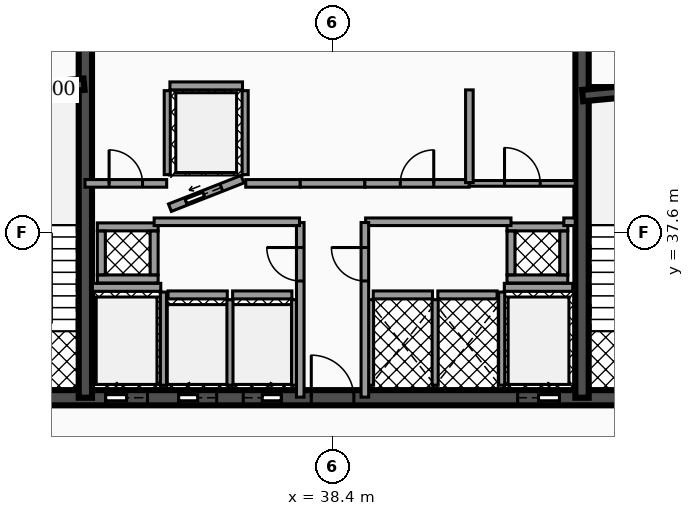
"""IFC4 building model, lengths in metres.
Left out: names, types, materials, properties, quantities, classifications, styles, units other than length and angle.
Written with IfcOpenShell. Run it as: python <this file> out.ifc"""

import sys

from ifc_helpers import new_model, si_unit, direction, frame, frame_2d, origin, place, context, subcontext, project, spatial, rectangle, extrude, element, fill, save


model = new_model("IFC4")
c1 = context("Model", 3, precision=1e-05, world=origin(), true_north=direction((0.0, 1.0)))
c2 = subcontext(c1, "Body", "Model", "MODEL_VIEW")
j1 = project(units=[si_unit("LENGTHUNIT", "METRE"), si_unit("PLANEANGLEUNIT", "RADIAN")], contexts=[c1])
p1 = place(None, origin())
s1 = spatial("IfcSite", under=j1, at=p1, CompositionType="ELEMENT")
p2 = place(p1, origin())
s2 = spatial("IfcBuilding", under=s1, at=p2, CompositionType="ELEMENT")
p3 = place(p2, frame((0.0, 0.0, 160.82)))
s3 = spatial("IfcBuildingStorey", under=s2, at=p3, CompositionType="ELEMENT", Elevation=160.82)
p4 = place(p3, frame((28.4, 33.25, 0.0), z_axis=(0.0, 0.0, 1.0), x_axis=(1.0, 0.0, 0.0)))
e1 = element("IfcWall", 1, at=p4, inside=s3, PredefinedType="SHEAR", context=c2, shape_type="SweptSolid", body=[
    extrude(rectangle(XDim=20.06, YDim=0.4, at=frame_2d((10.03, 0.0))), origin(), (0.0, 0.0, 1.0), 3.5),
])
p5 = place(p4, frame((4.03, 0.0, 0.0)))
e2 = element("IfcOpeningElement", 2, at=p5, cuts=e1, PredefinedType="OPENING", context=c2, shape_type="SweptSolid", body=[
    extrude(rectangle(XDim=1.1, YDim=2.15, at=frame_2d((0.55, 1.075))), frame((0.0, 0.21, 0.0), z_axis=(0.0, -1.0, 0.0), x_axis=(1.0, 0.0, 0.0)), (0.0, 0.0, 1.0), 0.42),
])
p6 = place(p4, frame((14.87, 0.0, 0.0)))
e3 = element("IfcOpeningElement", 3, at=p6, cuts=e1, PredefinedType="OPENING", context=c2, shape_type="SweptSolid", body=[
    extrude(rectangle(XDim=1.1, YDim=2.15, at=frame_2d((0.55, 1.075))), frame((0.0, 0.21, 0.0), z_axis=(0.0, -1.0, 0.0), x_axis=(1.0, 0.0, 0.0)), (0.0, 0.0, 1.0), 0.42),
])
p7 = place(p4, frame((5.95, 0.0, 0.0)))
e4 = element("IfcOpeningElement", 4, at=p7, cuts=e1, PredefinedType="OPENING", context=c2, shape_type="SweptSolid", body=[
    extrude(rectangle(XDim=1.0, YDim=2.1, at=frame_2d((0.5, 1.05))), frame((0.0, 0.21, 0.0), z_axis=(0.0, -1.0, 0.0), x_axis=(1.0, 0.0, 0.0)), (0.0, 0.0, 1.0), 0.42),
])
p8 = place(p4, frame((7.65, 0.0, 0.0)))
e5 = element("IfcOpeningElement", 5, at=p8, cuts=e1, PredefinedType="OPENING", context=c2, shape_type="SweptSolid", body=[
    extrude(rectangle(XDim=1.0, YDim=2.1, at=frame_2d((0.5, 1.05))), frame((0.0, 0.21, 0.0), z_axis=(0.0, -1.0, 0.0), x_axis=(1.0, 0.0, 0.0)), (0.0, 0.0, 1.0), 0.42),
])
p9 = place(p4, frame((1.31, 0.0, 0.0)))
e6 = element("IfcOpeningElement", 6, at=p9, cuts=e1, PredefinedType="OPENING", context=c2, shape_type="SweptSolid", body=[
    extrude(rectangle(XDim=1.1, YDim=2.2, at=frame_2d((0.55, 1.1))), frame((0.0, 0.21, 0.0), z_axis=(0.0, -1.0, 0.0), x_axis=(1.0, 0.0, 0.0)), (0.0, 0.0, 1.0), 0.42),
])
p10 = place(p4, frame((9.44, 0.0, 0.0)))
e7 = element("IfcOpeningElement", 7, at=p10, cuts=e1, PredefinedType="OPENING", context=c2, shape_type="SweptSolid", body=[
    extrude(rectangle(XDim=1.12, YDim=2.05, at=frame_2d((0.56, 1.025))), frame((0.0, 0.21, 0.0), z_axis=(0.0, -1.0, 0.0), x_axis=(1.0, 0.0, 0.0)), (0.0, 0.0, 1.0), 0.42),
])
p11 = place(p4, frame((17.65, 0.0, 0.0)))
e8 = element("IfcOpeningElement", 8, at=p11, cuts=e1, PredefinedType="OPENING", context=c2, shape_type="SweptSolid", body=[
    extrude(rectangle(XDim=1.1, YDim=2.2, at=frame_2d((0.55, 1.1))), frame((0.0, 0.21, 0.0), z_axis=(0.0, -1.0, 0.0), x_axis=(1.0, 0.0, 0.0)), (0.0, 0.0, 1.0), 0.42),
])
for number, where, z_axis, x_axis in (
    (9, (31.895, 33.25, 0.0), (0.0, 0.0, 1.0), (0.0, 1.0, 0.0)),
    (10, (44.965, 33.25, 0.0), (0.0, 0.0, 1.0), (0.0, 1.0, 0.0)),
):
    element("IfcWall", number, at=place(p3, frame(where, z_axis=z_axis, x_axis=x_axis)), inside=s3, PredefinedType="SHEAR", context=c2, shape_type="SweptSolid", body=[
        extrude(rectangle(XDim=10.2, YDim=0.35, at=frame_2d((5.1, 0.0))), origin(), (0.0, 0.0, 1.0), 3.5),
    ])
p12 = place(p3, frame((28.64, 41.2, 0.0), z_axis=(0.0, 0.0, 1.0), x_axis=(0.995687118776, 0.092774789157, 0.0)))
e11 = element("IfcWall", 11, at=p12, inside=s3, PredefinedType="SHEAR", context=c2, shape_type="SweptSolid", body=[
    extrude(rectangle(XDim=3.234, YDim=0.3, at=frame_2d((1.617, 0.0))), origin(), (0.0, 0.0, 1.0), 3.5),
])
p13 = place(p3, frame((44.98, 41.2, 0.0), z_axis=(0.0, 0.0, 1.0), x_axis=(0.995686468965, 0.09278176286, 0.0)))
e12 = element("IfcWall", 12, at=p13, inside=s3, PredefinedType="SHEAR", context=c2, shape_type="SweptSolid", body=[
    extrude(rectangle(XDim=3.234, YDim=0.3, at=frame_2d((1.617, 0.0))), origin(), (0.0, 0.0, 1.0), 3.5),
])
p14 = place(p3, frame((32.08, 36.155, 0.0), z_axis=(0.0, 0.0, 1.0), x_axis=(1.0, 0.0, 0.0)))
e13 = element("IfcWall", 13, at=p14, inside=s3, PredefinedType="SOLIDWALL", context=c2, shape_type="SweptSolid", body=[
    extrude(rectangle(XDim=1.8, YDim=0.21, at=frame_2d((0.9, 0.0))), origin(), (0.0, 0.0, 1.0), 2.472),
])
p15 = place(p3, frame((33.95, 33.58, 0.0), z_axis=(0.0, 0.0, 1.0), x_axis=(0.0, 1.0, 0.0)))
e14 = element("IfcWall", 14, at=p15, inside=s3, PredefinedType="SOLIDWALL", context=c2, shape_type="SweptSolid", body=[
    extrude(rectangle(XDim=2.45, YDim=0.16, at=frame_2d((1.225, 0.0))), origin(), (0.0, 0.0, 1.0), 2.472),
])
p16 = place(p3, frame((42.92, 36.155, 0.0), z_axis=(0.0, 0.0, 1.0), x_axis=(1.0, 0.0, 0.0)))
e15 = element("IfcWall", 15, at=p16, inside=s3, PredefinedType="SOLIDWALL", context=c2, shape_type="SweptSolid", body=[
    extrude(rectangle(XDim=1.8, YDim=0.21, at=frame_2d((0.9, 0.0))), origin(), (0.0, 0.0, 1.0), 2.472),
])
p17 = place(p3, frame((42.85, 33.58, 0.0), z_axis=(0.0, 0.0, 1.0), x_axis=(0.0, 1.0, 0.0)))
e16 = element("IfcWall", 16, at=p17, inside=s3, PredefinedType="SOLIDWALL", context=c2, shape_type="SweptSolid", body=[
    extrude(rectangle(XDim=2.45, YDim=0.16, at=frame_2d((1.225, 0.0))), origin(), (0.0, 0.0, 1.0), 2.472),
])
p18 = place(p3, frame((34.07, 35.955, 0.0), z_axis=(0.0, 0.0, 1.0), x_axis=(1.0, 0.0, 0.0)))
e17 = element("IfcWall", 17, at=p18, inside=s3, PredefinedType="SOLIDWALL", context=c2, shape_type="SweptSolid", body=[
    extrude(rectangle(XDim=1.56, YDim=0.21, at=frame_2d((0.78, 0.0))), origin(), (0.0, 0.0, 1.0), 2.472),
])
p19 = place(p3, frame((35.7, 33.58, 0.0), z_axis=(0.0, 0.0, 1.0), x_axis=(0.0, 1.0, 0.0)))
e18 = element("IfcWall", 18, at=p19, inside=s3, PredefinedType="SOLIDWALL", context=c2, shape_type="SweptSolid", body=[
    extrude(rectangle(XDim=2.25, YDim=0.16, at=frame_2d((1.125, 0.0))), origin(), (0.0, 0.0, 1.0), 2.472),
])
p20 = place(p3, frame((35.77, 35.955, 0.0), z_axis=(0.0, 0.0, 1.0), x_axis=(1.0, 0.0, 0.0)))
e19 = element("IfcWall", 19, at=p20, inside=s3, PredefinedType="SOLIDWALL", context=c2, shape_type="SweptSolid", body=[
    extrude(rectangle(XDim=1.56, YDim=0.21, at=frame_2d((0.78, 0.0))), origin(), (0.0, 0.0, 1.0), 2.472),
])
p21 = place(p3, frame((37.4, 33.58, 0.0), z_axis=(0.0, 0.0, 1.0), x_axis=(0.0, 1.0, 0.0)))
e20 = element("IfcWall", 20, at=p21, inside=s3, PredefinedType="SOLIDWALL", context=c2, shape_type="SweptSolid", body=[
    extrude(rectangle(XDim=2.25, YDim=0.16, at=frame_2d((1.125, 0.0))), origin(), (0.0, 0.0, 1.0), 2.472),
])
p22 = place(p3, frame((34.12, 38.25, 0.0), z_axis=(0.0, 0.0, 1.0), x_axis=(0.930804993012, 0.36551616241, 0.0)))
e21 = element("IfcWall", 21, at=p22, inside=s3, PredefinedType="SOLIDWALL", context=c2, shape_type="SweptSolid", body=[
    extrude(rectangle(XDim=2.052, YDim=0.21, at=frame_2d((1.026, 0.0))), origin(), (0.0, 0.0, 1.0), 2.472),
])
p23 = place(p22, frame((0.455, 0.0, 0.0)))
e22 = element("IfcOpeningElement", 22, at=p23, cuts=e21, PredefinedType="OPENING", context=c2, shape_type="SweptSolid", body=[
    extrude(rectangle(XDim=1.0, YDim=2.1, at=frame_2d((0.5, 1.05))), frame((0.0, 0.115, 0.0), z_axis=(0.0, -1.0, 0.0), x_axis=(1.0, 0.0, 0.0)), (0.0, 0.0, 1.0), 0.23),
])
p24 = place(p3, frame((34.12, 41.455, 0.0), z_axis=(0.0, 0.0, 1.0), x_axis=(1.0, 0.0, 0.0)))
e23 = element("IfcWall", 23, at=p24, inside=s3, PredefinedType="SOLIDWALL", context=c2, shape_type="SweptSolid", body=[
    extrude(rectangle(XDim=1.91, YDim=0.21, at=frame_2d((0.955, 0.0))), origin(), (0.0, 0.0, 1.0), 2.472),
])
for number, where, z_axis, x_axis in (
    (24, (34.05, 39.12, 0.0), (0.0, 0.0, 1.0), (0.0, 1.0, 0.0)),
    (25, (36.1, 39.12, 0.0), (0.0, 0.0, 1.0), (0.0, 1.0, 0.0)),
):
    element("IfcWall", number, at=place(p3, frame(where, z_axis=z_axis, x_axis=x_axis)), inside=s3, PredefinedType="SOLIDWALL", context=c2, shape_type="SweptSolid", body=[
        extrude(rectangle(XDim=2.21, YDim=0.16, at=frame_2d((1.105, 0.0))), origin(), (0.0, 0.0, 1.0), 2.472),
    ])
p25 = place(p3, frame((39.47, 35.955, 0.0), z_axis=(0.0, 0.0, 1.0), x_axis=(1.0, 0.0, 0.0)))
e26 = element("IfcWall", 26, at=p25, inside=s3, PredefinedType="SOLIDWALL", context=c2, shape_type="SweptSolid", body=[
    extrude(rectangle(XDim=1.56, YDim=0.21, at=frame_2d((0.78, 0.0))), origin(), (0.0, 0.0, 1.0), 2.472),
])
for number, where, z_axis, x_axis in (
    (27, (39.4, 33.58, 0.0), (0.0, 0.0, 1.0), (0.0, 1.0, 0.0)),
    (28, (41.1, 33.58, 0.0), (0.0, 0.0, 1.0), (0.0, 1.0, 0.0)),
):
    element("IfcWall", number, at=place(p3, frame(where, z_axis=z_axis, x_axis=x_axis)), inside=s3, PredefinedType="SOLIDWALL", context=c2, shape_type="SweptSolid", body=[
        extrude(rectangle(XDim=2.25, YDim=0.16, at=frame_2d((1.125, 0.0))), origin(), (0.0, 0.0, 1.0), 2.472),
    ])
p26 = place(p3, frame((41.17, 35.955, 0.0), z_axis=(0.0, 0.0, 1.0), x_axis=(1.0, 0.0, 0.0)))
e29 = element("IfcWall", 29, at=p26, inside=s3, PredefinedType="SOLIDWALL", context=c2, shape_type="SweptSolid", body=[
    extrude(rectangle(XDim=1.56, YDim=0.21, at=frame_2d((0.78, 0.0))), origin(), (0.0, 0.0, 1.0), 2.472),
])
for number, where, z_axis, x_axis in (
    (30, (32.21, 36.375, 0.0), (0.0, 0.0, 1.0), (1.0, 0.0, 0.0)),
    (31, (32.21, 37.745, 0.0), (0.0, 0.0, 1.0), (1.0, 0.0, 0.0)),
):
    element("IfcWall", number, at=place(p3, frame(where, z_axis=z_axis, x_axis=x_axis)), inside=s3, PredefinedType="SOLIDWALL", context=c2, shape_type="SweptSolid", body=[
        extrude(rectangle(XDim=1.6, YDim=0.21, at=frame_2d((0.8, 0.0))), origin(), (0.0, 0.0, 1.0), 3.5),
    ])
for number, where, z_axis, x_axis in (
    (32, (32.315, 36.485, 0.0), (0.0, 0.0, 1.0), (0.0, 1.0, 0.0)),
    (33, (33.705, 36.485, 0.0), (0.0, 0.0, 1.0), (0.0, 1.0, 0.0)),
):
    element("IfcWall", number, at=place(p3, frame(where, z_axis=z_axis, x_axis=x_axis)), inside=s3, PredefinedType="SOLIDWALL", context=c2, shape_type="SweptSolid", body=[
        extrude(rectangle(XDim=1.15, YDim=0.21, at=frame_2d((0.575, 0.0))), origin(), (0.0, 0.0, 1.0), 3.5),
    ])
for number, where, z_axis, x_axis in (
    (34, (42.99, 36.375, 0.0), (0.0, 0.0, 1.0), (1.0, 0.0, 0.0)),
    (35, (42.99, 37.745, 0.0), (0.0, 0.0, 1.0), (1.0, 0.0, 0.0)),
):
    element("IfcWall", number, at=place(p3, frame(where, z_axis=z_axis, x_axis=x_axis)), inside=s3, PredefinedType="SOLIDWALL", context=c2, shape_type="SweptSolid", body=[
        extrude(rectangle(XDim=1.6, YDim=0.21, at=frame_2d((0.8, 0.0))), origin(), (0.0, 0.0, 1.0), 3.5),
    ])
for number, where, z_axis, x_axis in (
    (36, (43.095, 36.485, 0.0), (0.0, 0.0, 1.0), (0.0, 1.0, 0.0)),
    (37, (44.485, 36.485, 0.0), (0.0, 0.0, 1.0), (0.0, 1.0, 0.0)),
):
    element("IfcWall", number, at=place(p3, frame(where, z_axis=z_axis, x_axis=x_axis)), inside=s3, PredefinedType="SOLIDWALL", context=c2, shape_type="SweptSolid", body=[
        extrude(rectangle(XDim=1.15, YDim=0.21, at=frame_2d((0.575, 0.0))), origin(), (0.0, 0.0, 1.0), 3.5),
    ])
p27 = place(p3, frame((37.55, 33.265, 0.0), z_axis=(0.0, 0.0, 1.0), x_axis=(0.0, 1.0, 0.0)))
e38 = element("IfcWall", 38, at=p27, inside=s3, PredefinedType="PARTITIONING", context=c2, shape_type="SweptSolid", body=[
    extrude(rectangle(XDim=4.595, YDim=0.2, at=frame_2d((2.298, 0.0))), origin(), (0.0, 0.0, 1.0), 2.457),
])
p28 = place(p27, frame((3.058, 0.0, 0.0)))
e39 = element("IfcOpeningElement", 39, at=p28, cuts=e38, PredefinedType="OPENING", context=c2, shape_type="SweptSolid", body=[
    extrude(rectangle(XDim=0.88, YDim=2.05, at=frame_2d((0.44, 1.025))), frame((0.0, 0.11, 0.0), z_axis=(0.0, -1.0, 0.0), x_axis=(1.0, 0.0, 0.0)), (0.0, 0.0, 1.0), 0.22),
])
p29 = place(p3, frame((33.705, 37.88, 0.0), z_axis=(0.0, 0.0, 1.0), x_axis=(1.0, 0.0, 0.0)))
e40 = element("IfcWall", 40, at=p29, inside=s3, PredefinedType="PARTITIONING", context=c2, shape_type="SweptSolid", body=[
    extrude(rectangle(XDim=3.825, YDim=0.2, at=frame_2d((1.913, 0.0))), origin(), (0.0, 0.0, 1.0), 2.457),
])
p30 = place(p3, frame((31.885, 38.89, 0.0), z_axis=(0.0, 0.0, 1.0), x_axis=(1.0, 0.0, 0.0)))
e41 = element("IfcWall", 41, at=p30, inside=s3, PredefinedType="PARTITIONING", context=c2, shape_type="SweptSolid", body=[
    extrude(rectangle(XDim=2.15, YDim=0.2, at=frame_2d((1.075, 0.0))), origin(), (0.0, 0.0, 1.0), 2.457),
])
p31 = place(p30, frame((0.635, 0.0, 0.0)))
e42 = element("IfcOpeningElement", 42, at=p31, cuts=e41, PredefinedType="OPENING", context=c2, shape_type="SweptSolid", body=[
    extrude(rectangle(XDim=0.88, YDim=2.05, at=frame_2d((0.44, 1.025))), frame((0.0, 0.11, 0.0), z_axis=(0.0, -1.0, 0.0), x_axis=(1.0, 0.0, 0.0)), (0.0, 0.0, 1.0), 0.22),
])
p32 = place(p3, frame((36.115, 38.89, 0.0), z_axis=(0.0, 0.0, 1.0), x_axis=(1.0, 0.0, 0.0)))
e43 = element("IfcWall", 43, at=p32, inside=s3, PredefinedType="PARTITIONING", context=c2, shape_type="SweptSolid", body=[
    extrude(rectangle(XDim=1.435, YDim=0.2, at=frame_2d((0.718, 0.0))), origin(), (0.0, 0.0, 1.0), 2.457),
])
p33 = place(p3, frame((37.55, 38.89, 0.0), z_axis=(0.0, 0.0, 1.0), x_axis=(1.0, 0.0, 0.0)))
e44 = element("IfcWall", 44, at=p33, inside=s3, PredefinedType="PARTITIONING", context=c2, shape_type="SweptSolid", body=[
    extrude(rectangle(XDim=1.7, YDim=0.2, at=frame_2d((0.85, 0.0))), origin(), (0.0, 0.0, 1.0), 2.457),
])
p34 = place(p3, frame((39.25, 38.89, 0.0), z_axis=(0.0, 0.0, 1.0), x_axis=(1.0, 0.0, 0.0)))
e45 = element("IfcWall", 45, at=p34, inside=s3, PredefinedType="PARTITIONING", context=c2, shape_type="SweptSolid", body=[
    extrude(rectangle(XDim=2.745, YDim=0.2, at=frame_2d((1.373, 0.0))), origin(), (0.0, 0.0, 1.0), 2.457),
])
p35 = place(p34, frame((0.933, 0.0, 0.0)))
e46 = element("IfcOpeningElement", 46, at=p35, cuts=e45, PredefinedType="OPENING", context=c2, shape_type="SweptSolid", body=[
    extrude(rectangle(XDim=0.88, YDim=2.05, at=frame_2d((0.44, 1.025))), frame((0.0, 0.11, 0.0), z_axis=(0.0, -1.0, 0.0), x_axis=(1.0, 0.0, 0.0)), (0.0, 0.0, 1.0), 0.22),
])
p36 = place(p3, frame((42.005, 38.89, 0.0), z_axis=(0.0, 0.0, 1.0), x_axis=(1.0, 0.0, 0.0)))
e47 = element("IfcWall", 47, at=p36, inside=s3, PredefinedType="PARTITIONING", context=c2, shape_type="SweptSolid", body=[
    extrude(rectangle(XDim=2.78, YDim=0.15, at=frame_2d((1.39, 0.0))), origin(), (0.0, 0.0, 1.0), 2.457),
])
p37 = place(p36, frame((0.92, 0.0, 0.0)))
e48 = element("IfcOpeningElement", 48, at=p37, cuts=e47, PredefinedType="OPENING", context=c2, shape_type="SweptSolid", body=[
    extrude(rectangle(XDim=0.94, YDim=2.05, at=frame_2d((0.47, 1.025))), frame((0.0, 0.085, 0.0), z_axis=(0.0, -1.0, 0.0), x_axis=(1.0, 0.0, 0.0)), (0.0, 0.0, 1.0), 0.17),
])
p38 = place(p3, frame((39.27, 37.88, 0.0), z_axis=(0.0, 0.0, 1.0), x_axis=(1.0, 0.0, 0.0)))
e49 = element("IfcWall", 49, at=p38, inside=s3, PredefinedType="PARTITIONING", context=c2, shape_type="SweptSolid", body=[
    extrude(rectangle(XDim=3.825, YDim=0.2, at=frame_2d((1.913, 0.0))), origin(), (0.0, 0.0, 1.0), 2.457),
])
p39 = place(p3, frame((44.485, 37.88, 0.0), z_axis=(0.0, 0.0, 1.0), x_axis=(1.0, 0.0, 0.0)))
e50 = element("IfcWall", 50, at=p39, inside=s3, PredefinedType="PARTITIONING", context=c2, shape_type="SweptSolid", body=[
    extrude(rectangle(XDim=0.3, YDim=0.2, at=frame_2d((0.15, 0.0))), origin(), (0.0, 0.0, 1.0), 2.457),
])
p40 = place(p3, frame((39.25, 33.265, 0.0), z_axis=(0.0, 0.0, 1.0), x_axis=(0.0, 1.0, 0.0)))
e51 = element("IfcWall", 51, at=p40, inside=s3, PredefinedType="PARTITIONING", context=c2, shape_type="SweptSolid", body=[
    extrude(rectangle(XDim=4.595, YDim=0.2, at=frame_2d((2.298, 0.0))), origin(), (0.0, 0.0, 1.0), 2.457),
])
p41 = place(p40, frame((3.058, 0.0, 0.0)))
e52 = element("IfcOpeningElement", 52, at=p41, cuts=e51, PredefinedType="OPENING", context=c2, shape_type="SweptSolid", body=[
    extrude(rectangle(XDim=0.88, YDim=2.05, at=frame_2d((0.44, 1.025))), frame((0.0, 0.11, 0.0), z_axis=(0.0, -1.0, 0.0), x_axis=(1.0, 0.0, 0.0)), (0.0, 0.0, 1.0), 0.22),
])
p42 = place(p3, frame((42.0, 38.91, 0.0), z_axis=(0.0, 0.0, 1.0), x_axis=(0.0, 1.0, 0.0)))
e53 = element("IfcWall", 53, at=p42, inside=s3, PredefinedType="PARTITIONING", context=c2, shape_type="SweptSolid", body=[
    extrude(rectangle(XDim=2.44, YDim=0.2, at=frame_2d((1.22, 0.0))), origin(), (0.0, 0.0, 1.0), 2.457),
])
p43 = place(p5, origin())
e54 = element("IfcDoor", 54, at=p43, inside=s3, OperationType="SLIDING_TO_LEFT", PredefinedType="DOOR", context=c2, shape_type="SweptSolid", body=[
    extrude(rectangle(XDim=1.1, YDim=2.15, at=frame_2d((0.55, 1.075))), frame((0.0, 0.025, 0.0), z_axis=(0.0, -1.0, 0.0), x_axis=(1.0, 0.0, 0.0)), (0.0, 0.0, 1.0), 0.05),
])
fill(e2, e54)
p44 = place(p6, origin())
e55 = element("IfcDoor", 55, at=p44, inside=s3, OperationType="SLIDING_TO_RIGHT", PredefinedType="DOOR", context=c2, shape_type="SweptSolid", body=[
    extrude(rectangle(XDim=1.1, YDim=2.15, at=frame_2d((0.55, 1.075))), frame((0.0, 0.025, 0.0), z_axis=(0.0, -1.0, 0.0), x_axis=(1.0, 0.0, 0.0)), (0.0, 0.0, 1.0), 0.05),
])
fill(e3, e55)
p45 = place(p7, origin())
e56 = element("IfcDoor", 56, at=p45, inside=s3, OperationType="SLIDING_TO_LEFT", PredefinedType="DOOR", context=c2, shape_type="SweptSolid", body=[
    extrude(rectangle(XDim=1.0, YDim=2.1, at=frame_2d((0.5, 1.05))), frame((0.0, 0.025, 0.0), z_axis=(0.0, -1.0, 0.0), x_axis=(1.0, 0.0, 0.0)), (0.0, 0.0, 1.0), 0.05),
])
fill(e4, e56)
p46 = place(p8, origin())
e57 = element("IfcDoor", 57, at=p46, inside=s3, OperationType="SLIDING_TO_RIGHT", PredefinedType="DOOR", context=c2, shape_type="SweptSolid", body=[
    extrude(rectangle(XDim=1.0, YDim=2.1, at=frame_2d((0.5, 1.05))), frame((0.0, 0.025, 0.0), z_axis=(0.0, -1.0, 0.0), x_axis=(1.0, 0.0, 0.0)), (0.0, 0.0, 1.0), 0.05),
])
fill(e5, e57)
p47 = place(p23, origin())
e58 = element("IfcDoor", 58, at=p47, inside=s3, OperationType="SLIDING_TO_LEFT", PredefinedType="DOOR", context=c2, shape_type="SweptSolid", body=[
    extrude(rectangle(XDim=1.0, YDim=2.1, at=frame_2d((0.5, 1.05))), frame((0.0, 0.025, 0.0), z_axis=(0.0, -1.0, 0.0), x_axis=(1.0, 0.0, 0.0)), (0.0, 0.0, 1.0), 0.05),
])
fill(e22, e58)
p48 = place(p10, origin())
e59 = element("IfcDoor", 59, at=p48, inside=s3, OperationType="SINGLE_SWING_LEFT", PredefinedType="DOOR", context=c2, shape_type="SweptSolid", body=[
    extrude(rectangle(XDim=1.12, YDim=2.05, at=frame_2d((0.56, 1.025))), frame((0.0, 0.025, 0.0), z_axis=(0.0, -1.0, 0.0), x_axis=(1.0, 0.0, 0.0)), (0.0, 0.0, 1.0), 0.05),
])
fill(e7, e59)
p49 = place(p28, origin())
e60 = element("IfcDoor", 60, at=p49, inside=s3, OperationType="SINGLE_SWING_RIGHT", PredefinedType="DOOR", context=c2, shape_type="SweptSolid", body=[
    extrude(rectangle(XDim=0.88, YDim=2.05, at=frame_2d((0.44, 1.025))), frame((0.0, 0.025, 0.0), z_axis=(0.0, -1.0, 0.0), x_axis=(1.0, 0.0, 0.0)), (0.0, 0.0, 1.0), 0.05),
])
fill(e39, e60)
p50 = place(p31, origin())
e61 = element("IfcDoor", 61, at=p50, inside=s3, OperationType="SINGLE_SWING_LEFT", PredefinedType="DOOR", context=c2, shape_type="SweptSolid", body=[
    extrude(rectangle(XDim=0.88, YDim=2.05, at=frame_2d((0.44, 1.025))), frame((0.0, 0.025, 0.0), z_axis=(0.0, -1.0, 0.0), x_axis=(1.0, 0.0, 0.0)), (0.0, 0.0, 1.0), 0.05),
])
fill(e42, e61)
p51 = place(p35, origin())
e62 = element("IfcDoor", 62, at=p51, inside=s3, OperationType="SINGLE_SWING_RIGHT", PredefinedType="DOOR", context=c2, shape_type="SweptSolid", body=[
    extrude(rectangle(XDim=0.88, YDim=2.05, at=frame_2d((0.44, 1.025))), frame((0.0, 0.025, 0.0), z_axis=(0.0, -1.0, 0.0), x_axis=(1.0, 0.0, 0.0)), (0.0, 0.0, 1.0), 0.05),
])
fill(e46, e62)
p52 = place(p37, origin())
e63 = element("IfcDoor", 63, at=p52, inside=s3, OperationType="SINGLE_SWING_LEFT", PredefinedType="DOOR", context=c2, shape_type="SweptSolid", body=[
    extrude(rectangle(XDim=0.94, YDim=2.05, at=frame_2d((0.47, 1.025))), frame((0.0, 0.025, 0.0), z_axis=(0.0, -1.0, 0.0), x_axis=(1.0, 0.0, 0.0)), (0.0, 0.0, 1.0), 0.05),
])
fill(e48, e63)
p53 = place(p41, origin())
e64 = element("IfcDoor", 64, at=p53, inside=s3, OperationType="SINGLE_SWING_RIGHT", PredefinedType="DOOR", context=c2, shape_type="SweptSolid", body=[
    extrude(rectangle(XDim=0.88, YDim=2.05, at=frame_2d((0.44, 1.025))), frame((0.0, 0.025, 0.0), z_axis=(0.0, -1.0, 0.0), x_axis=(1.0, 0.0, 0.0)), (0.0, 0.0, 1.0), 0.05),
])
fill(e52, e64)
save(model, sys.argv[1])
